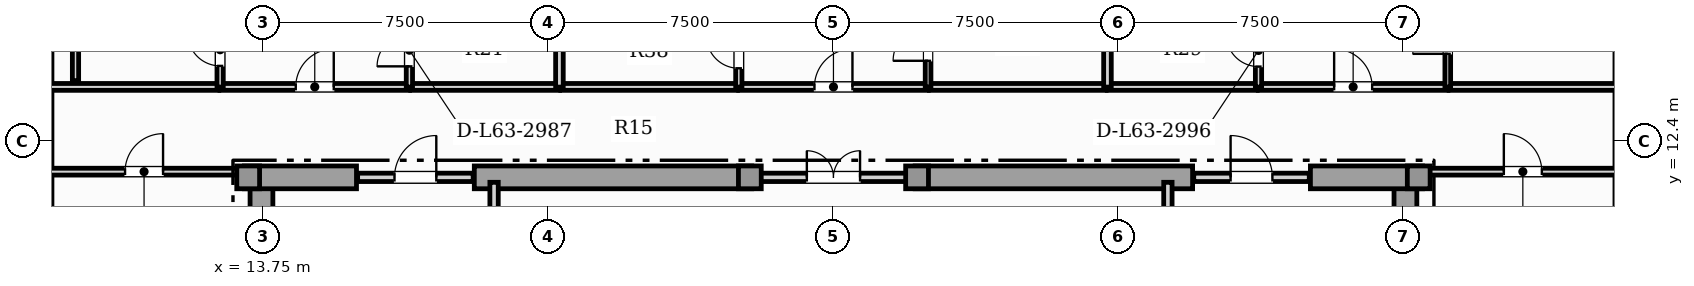
"""IFC4 building model, lengths in metres.
Left out: names, types, materials, properties, quantities, classifications, styles, units other than length and angle.
Written with IfcOpenShell. Run it as: python <this file> out.ifc"""

import sys

from ifc_helpers import new_model, si_unit, direction, frame, frame_2d, origin, origin_2d, place, context, subcontext, project, spatial, rectangle, extrude, element, fill, save


model = new_model("IFC4")
c1 = context("Model", 3, precision=1e-05, world=origin(), true_north=direction((0.0, 1.0)))
c2 = subcontext(c1, "Body", "Model", "MODEL_VIEW")
j1 = project(units=[si_unit("LENGTHUNIT", "METRE"), si_unit("PLANEANGLEUNIT", "RADIAN")], contexts=[c1])
p1 = place(None, origin())
s1 = spatial("IfcSite", under=j1, at=p1, CompositionType="ELEMENT")
p2 = place(p1, origin())
s2 = spatial("IfcBuilding", under=s1, at=p2, CompositionType="ELEMENT")
p3 = place(p2, frame((0.0, 0.0, 256.75)))
s3 = spatial("IfcBuildingStorey", under=s2, at=p3, CompositionType="ELEMENT", Elevation=256.75)
for number, where, z_axis, x_axis in (
    (1, (13.7, 0.92, 0.0), (0.0, 0.0, 1.0), (0.0, 1.0, 0.0)),
    (2, (43.8, 0.92, 0.0), (0.0, 0.0, 1.0), (0.0, 1.0, 0.0)),
):
    element("IfcWall", number, at=place(p3, frame(where, z_axis=z_axis, x_axis=x_axis)), inside=s3, PredefinedType="SHEAR", context=c2, shape_type="SweptSolid", body=[
        extrude(rectangle(XDim=10.53, YDim=0.6, at=frame_2d((5.265, 0.0))), origin(), (0.0, 0.0, 1.0), 3.65),
    ])
p4 = place(p3, frame((13.25, 11.45, 0.0), z_axis=(0.0, 0.0, 1.0), x_axis=(1.0, 0.0, 0.0)))
e3 = element("IfcWall", 3, at=p4, inside=s3, PredefinedType="SHEAR", context=c2, shape_type="SweptSolid", body=[
    extrude(rectangle(XDim=2.95, YDim=0.6, at=frame_2d((1.475, 0.0))), origin(), (0.0, 0.0, 1.0), 3.65),
])
for number, where, z_axis, x_axis in (
    (4, (19.3, 11.45, 0.0), (0.0, 0.0, 1.0), (1.0, 0.0, 0.0)),
    (5, (30.9, 11.45, 0.0), (0.0, 0.0, 1.0), (1.0, 0.0, 0.0)),
):
    element("IfcWall", number, at=place(p3, frame(where, z_axis=z_axis, x_axis=x_axis)), inside=s3, PredefinedType="SHEAR", context=c2, shape_type="SweptSolid", body=[
        extrude(rectangle(XDim=7.3, YDim=0.6, at=frame_2d((3.65, 0.0))), origin(), (0.0, 0.0, 1.0), 3.65),
    ])
p5 = place(p3, frame((41.3, 11.45, 0.0), z_axis=(0.0, 0.0, 1.0), x_axis=(1.0, 0.0, 0.0)))
e6 = element("IfcWall", 6, at=p5, inside=s3, PredefinedType="SHEAR", context=c2, shape_type="SweptSolid", body=[
    extrude(rectangle(XDim=2.95, YDim=0.6, at=frame_2d((1.475, 0.0))), origin(), (0.0, 0.0, 1.0), 3.65),
])
for number, where, z_axis, x_axis in (
    (7, (13.35, 11.45, 0.0), (0.0, 0.0, 1.0), (1.0, 0.0, 0.0)),
    (8, (44.15, 11.45, 0.0), (0.0, 0.0, 1.0), (1.0, 0.0, 0.0)),
    (9, (26.55, 11.45, 0.0), (0.0, 0.0, 1.0), (1.0, 0.0, 0.0)),
    (10, (30.95, 11.45, 0.0), (0.0, 0.0, 1.0), (1.0, 0.0, 0.0)),
):
    element("IfcColumn", number, at=place(p3, frame(where, z_axis=z_axis, x_axis=x_axis)), inside=s3, PredefinedType="COLUMN", context=c2, shape_type="SweptSolid", body=[
        extrude(rectangle(XDim=0.6, YDim=0.6, at=origin_2d()), origin(), (0.0, 0.0, 1.0), 3.85),
    ])
p6 = place(p3, frame((19.82, 8.52, 0.0), z_axis=(0.0, 0.0, 1.0), x_axis=(0.0, 1.0, 0.0)))
e11 = element("IfcWall", 11, at=p6, inside=s3, PredefinedType="SOLIDWALL", context=c2, shape_type="SweptSolid", body=[
    extrude(rectangle(XDim=2.8, YDim=0.22, at=frame_2d((1.4, 0.0))), origin(), (0.0, 0.0, 1.0), 3.105),
])
p7 = place(p6, frame((0.85, 0.0, 0.0)))
e12 = element("IfcOpeningElement", 12, at=p7, cuts=e11, PredefinedType="OPENING", context=c2, shape_type="SweptSolid", body=[
    extrude(rectangle(XDim=1.1, YDim=2.2, at=frame_2d((0.55, 1.1))), frame((0.0, 0.12, 0.0), z_axis=(0.0, -1.0, 0.0), x_axis=(1.0, 0.0, 0.0)), (0.0, 0.0, 1.0), 0.24),
])
p8 = place(p3, frame((37.55, 8.52, 0.0), z_axis=(0.0, 0.0, 1.0), x_axis=(0.0, 1.0, 0.0)))
e13 = element("IfcWall", 13, at=p8, inside=s3, PredefinedType="SOLIDWALL", context=c2, shape_type="SweptSolid", body=[
    extrude(rectangle(XDim=2.8, YDim=0.22, at=frame_2d((1.4, 0.0))), origin(), (0.0, 0.0, 1.0), 3.105),
])
p9 = place(p8, frame((0.85, 0.0, 0.0)))
e14 = element("IfcOpeningElement", 14, at=p9, cuts=e13, PredefinedType="OPENING", context=c2, shape_type="SweptSolid", body=[
    extrude(rectangle(XDim=1.1, YDim=2.2, at=frame_2d((0.55, 1.1))), frame((0.0, 0.12, 0.0), z_axis=(0.0, -1.0, 0.0), x_axis=(1.0, 0.0, 0.0)), (0.0, 0.0, 1.0), 0.24),
])
p10 = place(p3, frame((16.23, 11.45, 0.0), z_axis=(0.0, 0.0, 1.0), x_axis=(1.0, 0.0, 0.0)))
e15 = element("IfcWall", 15, at=p10, inside=s3, PredefinedType="SOLIDWALL", context=c2, shape_type="SweptSolid", body=[
    extrude(rectangle(XDim=3.04, YDim=0.22, at=frame_2d((1.52, 0.0))), origin(), (0.0, 0.0, 1.0), 3.65),
])
p11 = place(p10, frame((0.97, 0.0, 0.0)))
e16 = element("IfcOpeningElement", 16, at=p11, cuts=e15, PredefinedType="OPENING", context=c2, shape_type="SweptSolid", body=[
    extrude(rectangle(XDim=1.1, YDim=2.2, at=frame_2d((0.55, 1.1))), frame((0.0, 0.12, 0.0), z_axis=(0.0, -1.0, 0.0), x_axis=(1.0, 0.0, 0.0)), (0.0, 0.0, 1.0), 0.24),
])
p12 = place(p3, frame((26.63, 11.45, 0.0), z_axis=(0.0, 0.0, 1.0), x_axis=(1.0, 0.0, 0.0)))
e17 = element("IfcWall", 17, at=p12, inside=s3, PredefinedType="SOLIDWALL", context=c2, shape_type="SweptSolid", body=[
    extrude(rectangle(XDim=4.24, YDim=0.22, at=frame_2d((2.12, 0.0))), origin(), (0.0, 0.0, 1.0), 3.65),
])
p13 = place(p12, frame((1.42, 0.0, 0.0)))
e18 = element("IfcOpeningElement", 18, at=p13, cuts=e17, PredefinedType="OPENING", context=c2, shape_type="SweptSolid", body=[
    extrude(rectangle(XDim=1.4, YDim=2.2, at=frame_2d((0.7, 1.1))), frame((0.0, 0.12, 0.0), z_axis=(0.0, -1.0, 0.0), x_axis=(1.0, 0.0, 0.0)), (0.0, 0.0, 1.0), 0.24),
])
p14 = place(p3, frame((38.23, 11.45, 0.0), z_axis=(0.0, 0.0, 1.0), x_axis=(1.0, 0.0, 0.0)))
e19 = element("IfcWall", 19, at=p14, inside=s3, PredefinedType="SOLIDWALL", context=c2, shape_type="SweptSolid", body=[
    extrude(rectangle(XDim=3.04, YDim=0.22, at=frame_2d((1.52, 0.0))), origin(), (0.0, 0.0, 1.0), 3.65),
])
p15 = place(p14, frame((0.97, 0.0, 0.0)))
e20 = element("IfcOpeningElement", 20, at=p15, cuts=e19, PredefinedType="OPENING", context=c2, shape_type="SweptSolid", body=[
    extrude(rectangle(XDim=1.1, YDim=2.2, at=frame_2d((0.55, 1.1))), frame((0.0, 0.12, 0.0), z_axis=(0.0, -1.0, 0.0), x_axis=(1.0, 0.0, 0.0)), (0.0, 0.0, 1.0), 0.24),
])
p16 = place(p3, frame((8.076, 11.6, 0.0), z_axis=(0.0, 0.0, 1.0), x_axis=(1.0, 0.0, 0.0)))
e21 = element("IfcWall", 21, at=p16, inside=s3, PredefinedType="PARTITIONING", context=c2, shape_type="SweptSolid", body=[
    extrude(rectangle(XDim=5.069, YDim=0.18, at=frame_2d((2.534, 0.0))), origin(), (0.0, 0.0, 1.0), 3.65),
])
p17 = place(p16, frame((2.034, 0.0, 0.0)))
e22 = element("IfcOpeningElement", 22, at=p17, cuts=e21, PredefinedType="OPENING", context=c2, shape_type="SweptSolid", body=[
    extrude(rectangle(XDim=1.0, YDim=2.15, at=frame_2d((0.5, 1.075))), frame((0.0, 0.1, 0.0), z_axis=(0.0, -1.0, 0.0), x_axis=(1.0, 0.0, 0.0)), (0.0, 0.0, 1.0), 0.2),
])
p18 = place(p3, frame((44.355, 11.6, 0.0), z_axis=(0.0, 0.0, 1.0), x_axis=(1.0, 0.0, 0.0)))
e23 = element("IfcWall", 23, at=p18, inside=s3, PredefinedType="PARTITIONING", context=c2, shape_type="SweptSolid", body=[
    extrude(rectangle(XDim=5.069, YDim=0.18, at=frame_2d((2.534, 0.0))), origin(), (0.0, 0.0, 1.0), 3.65),
])
p19 = place(p18, frame((2.034, 0.0, 0.0)))
e24 = element("IfcOpeningElement", 24, at=p19, cuts=e23, PredefinedType="OPENING", context=c2, shape_type="SweptSolid", body=[
    extrude(rectangle(XDim=1.0, YDim=2.15, at=frame_2d((0.5, 1.075))), frame((0.0, 0.1, 0.0), z_axis=(0.0, -1.0, 0.0), x_axis=(1.0, 0.0, 0.0)), (0.0, 0.0, 1.0), 0.2),
])
p20 = place(p3, frame((12.607, 13.83, 0.0), z_axis=(0.0, 0.0, 1.0), x_axis=(1.0, 0.0, 0.0)))
e25 = element("IfcWall", 25, at=p20, inside=s3, PredefinedType="PARTITIONING", context=c2, shape_type="SweptSolid", body=[
    extrude(rectangle(XDim=4.99, YDim=0.18, at=frame_2d((2.495, 0.0))), origin(), (0.0, 0.0, 1.0), 3.65),
])
p21 = place(p20, frame((1.995, 0.0, 0.0)))
e26 = element("IfcOpeningElement", 26, at=p21, cuts=e25, PredefinedType="OPENING", context=c2, shape_type="SweptSolid", body=[
    extrude(rectangle(XDim=1.0, YDim=2.15, at=frame_2d((0.5, 1.075))), frame((0.0, 0.1, 0.0), z_axis=(0.0, -1.0, 0.0), x_axis=(1.0, 0.0, 0.0)), (0.0, 0.0, 1.0), 0.2),
])
p22 = place(p3, frame((8.076, 13.83, 0.0), z_axis=(0.0, 0.0, 1.0), x_axis=(1.0, 0.0, 0.0)))
e27 = element("IfcWall", 27, at=p22, inside=s3, PredefinedType="PARTITIONING", context=c2, shape_type="SweptSolid", body=[
    extrude(rectangle(XDim=4.501, YDim=0.18, at=frame_2d((2.25, 0.0))), origin(), (0.0, 0.0, 1.0), 3.65),
])
p23 = place(p3, frame((17.627, 13.83, 0.0), z_axis=(0.0, 0.0, 1.0), x_axis=(1.0, 0.0, 0.0)))
e28 = element("IfcWall", 28, at=p23, inside=s3, PredefinedType="PARTITIONING", context=c2, shape_type="SweptSolid", body=[
    extrude(rectangle(XDim=3.918, YDim=0.18, at=frame_2d((1.959, 0.0))), origin(), (0.0, 0.0, 1.0), 3.65),
])
p24 = place(p3, frame((39.929, 13.83, 0.0), z_axis=(0.0, 0.0, 1.0), x_axis=(1.0, 0.0, 0.0)))
e29 = element("IfcWall", 29, at=p24, inside=s3, PredefinedType="PARTITIONING", context=c2, shape_type="SweptSolid", body=[
    extrude(rectangle(XDim=4.99, YDim=0.18, at=frame_2d((2.495, 0.0))), origin(), (0.0, 0.0, 1.0), 3.65),
])
p25 = place(p24, frame((1.995, 0.0, 0.0)))
e30 = element("IfcOpeningElement", 30, at=p25, cuts=e29, PredefinedType="OPENING", context=c2, shape_type="SweptSolid", body=[
    extrude(rectangle(XDim=1.0, YDim=2.15, at=frame_2d((0.5, 1.075))), frame((0.0, 0.1, 0.0), z_axis=(0.0, -1.0, 0.0), x_axis=(1.0, 0.0, 0.0)), (0.0, 0.0, 1.0), 0.2),
])
p26 = place(p3, frame((35.955, 13.83, 0.0), z_axis=(0.0, 0.0, 1.0), x_axis=(1.0, 0.0, 0.0)))
e31 = element("IfcWall", 31, at=p26, inside=s3, PredefinedType="PARTITIONING", context=c2, shape_type="SweptSolid", body=[
    extrude(rectangle(XDim=3.944, YDim=0.18, at=frame_2d((1.972, 0.0))), origin(), (0.0, 0.0, 1.0), 3.65),
])
p27 = place(p3, frame((44.949, 13.83, 0.0), z_axis=(0.0, 0.0, 1.0), x_axis=(1.0, 0.0, 0.0)))
e32 = element("IfcWall", 32, at=p27, inside=s3, PredefinedType="PARTITIONING", context=c2, shape_type="SweptSolid", body=[
    extrude(rectangle(XDim=4.475, YDim=0.18, at=frame_2d((2.237, 0.0))), origin(), (0.0, 0.0, 1.0), 3.65),
])
p28 = place(p3, frame((26.255, 13.83, 0.0), z_axis=(0.0, 0.0, 1.0), x_axis=(1.0, 0.0, 0.0)))
e33 = element("IfcWall", 33, at=p28, inside=s3, PredefinedType="PARTITIONING", context=c2, shape_type="SweptSolid", body=[
    extrude(rectangle(XDim=4.99, YDim=0.18, at=frame_2d((2.495, 0.0))), origin(), (0.0, 0.0, 1.0), 3.65),
])
p29 = place(p28, frame((1.995, 0.0, 0.0)))
e34 = element("IfcOpeningElement", 34, at=p29, cuts=e33, PredefinedType="OPENING", context=c2, shape_type="SweptSolid", body=[
    extrude(rectangle(XDim=1.0, YDim=2.15, at=frame_2d((0.5, 1.075))), frame((0.0, 0.1, 0.0), z_axis=(0.0, -1.0, 0.0), x_axis=(1.0, 0.0, 0.0)), (0.0, 0.0, 1.0), 0.2),
])
for number, where, z_axis, x_axis in (
    (35, (21.575, 13.83, 0.0), (0.0, 0.0, 1.0), (1.0, 0.0, 0.0)),
    (36, (31.275, 13.83, 0.0), (0.0, 0.0, 1.0), (1.0, 0.0, 0.0)),
):
    element("IfcWall", number, at=place(p3, frame(where, z_axis=z_axis, x_axis=x_axis)), inside=s3, PredefinedType="PARTITIONING", context=c2, shape_type="SweptSolid", body=[
        extrude(rectangle(XDim=4.65, YDim=0.18, at=frame_2d((2.325, 0.0))), origin(), (0.0, 0.0, 1.0), 3.65),
    ])
p30 = place(p3, frame((12.612, 13.825, 0.0), z_axis=(0.0, 0.0, 1.0), x_axis=(0.0, 1.0, 0.0)))
e37 = element("IfcWall", 37, at=p30, inside=s3, PredefinedType="PLUMBINGWALL", context=c2, shape_type="SweptSolid", body=[
    extrude(rectangle(XDim=1.967, YDim=0.165, at=frame_2d((0.983, 0.0))), origin(), (0.0, 0.0, 1.0), 3.65),
])
p31 = place(p30, frame((0.558, 0.0, 0.0)))
e38 = element("IfcOpeningElement", 38, at=p31, cuts=e37, PredefinedType="OPENING", context=c2, shape_type="SweptSolid", body=[
    extrude(rectangle(XDim=0.85, YDim=2.1, at=frame_2d((0.425, 1.05))), frame((0.0, 0.093, 0.0), z_axis=(0.0, -1.0, 0.0), x_axis=(1.0, 0.0, 0.0)), (0.0, 0.0, 1.0), 0.185),
])
p32 = place(p3, frame((17.592, 13.825, 0.0), z_axis=(0.0, 0.0, 1.0), x_axis=(0.0, 1.0, 0.0)))
e39 = element("IfcWall", 39, at=p32, inside=s3, PredefinedType="PLUMBINGWALL", context=c2, shape_type="SweptSolid", body=[
    extrude(rectangle(XDim=1.942, YDim=0.165, at=frame_2d((0.971, 0.0))), origin(), (0.0, 0.0, 1.0), 3.65),
])
p33 = place(p32, frame((0.546, 0.0, 0.0)))
e40 = element("IfcOpeningElement", 40, at=p33, cuts=e39, PredefinedType="OPENING", context=c2, shape_type="SweptSolid", body=[
    extrude(rectangle(XDim=0.85, YDim=2.1, at=frame_2d((0.425, 1.05))), frame((0.0, 0.093, 0.0), z_axis=(0.0, -1.0, 0.0), x_axis=(1.0, 0.0, 0.0)), (0.0, 0.0, 1.0), 0.185),
])
p34 = place(p3, frame((21.54, 13.825, 0.0), z_axis=(0.0, 0.0, 1.0), x_axis=(0.0, 1.0, 0.0)))
e41 = element("IfcWall", 41, at=p34, inside=s3, PredefinedType="PARTITIONING", context=c2, shape_type="SweptSolid", body=[
    extrude(rectangle(XDim=1.84, YDim=0.2, at=frame_2d((0.92, 0.0))), origin(), (0.0, 0.0, 1.0), 3.65),
])
p35 = place(p3, frame((39.934, 13.825, 0.0), z_axis=(0.0, 0.0, 1.0), x_axis=(0.0, 1.0, 0.0)))
e42 = element("IfcWall", 42, at=p35, inside=s3, PredefinedType="PLUMBINGWALL", context=c2, shape_type="SweptSolid", body=[
    extrude(rectangle(XDim=1.929, YDim=0.165, at=frame_2d((0.965, 0.0))), origin(), (0.0, 0.0, 1.0), 3.65),
])
p36 = place(p35, frame((0.54, 0.0, 0.0)))
e43 = element("IfcOpeningElement", 43, at=p36, cuts=e42, PredefinedType="OPENING", context=c2, shape_type="SweptSolid", body=[
    extrude(rectangle(XDim=0.85, YDim=2.1, at=frame_2d((0.425, 1.05))), frame((0.0, 0.093, 0.0), z_axis=(0.0, -1.0, 0.0), x_axis=(1.0, 0.0, 0.0)), (0.0, 0.0, 1.0), 0.185),
])
p37 = place(p3, frame((44.914, 13.825, 0.0), z_axis=(0.0, 0.0, 1.0), x_axis=(0.0, 1.0, 0.0)))
e44 = element("IfcWall", 44, at=p37, inside=s3, PredefinedType="PARTITIONING", context=c2, shape_type="SweptSolid", body=[
    extrude(rectangle(XDim=2.67, YDim=0.15, at=frame_2d((1.335, 0.0))), origin(), (0.0, 0.0, 1.0), 3.65),
])
p38 = place(p37, frame((0.875, 0.0, 0.0)))
e45 = element("IfcOpeningElement", 45, at=p38, cuts=e44, PredefinedType="OPENING", context=c2, shape_type="SweptSolid", body=[
    extrude(rectangle(XDim=0.92, YDim=2.1, at=frame_2d((0.46, 1.05))), frame((0.0, 0.085, 0.0), z_axis=(0.0, -1.0, 0.0), x_axis=(1.0, 0.0, 0.0)), (0.0, 0.0, 1.0), 0.17),
])
p39 = place(p3, frame((35.96, 13.825, 0.0), z_axis=(0.0, 0.0, 1.0), x_axis=(0.0, 1.0, 0.0)))
e46 = element("IfcWall", 46, at=p39, inside=s3, PredefinedType="PARTITIONING", context=c2, shape_type="SweptSolid", body=[
    extrude(rectangle(XDim=1.929, YDim=0.2, at=frame_2d((0.965, 0.0))), origin(), (0.0, 0.0, 1.0), 3.65),
])
p40 = place(p3, frame((26.26, 13.825, 0.0), z_axis=(0.0, 0.0, 1.0), x_axis=(0.0, 1.0, 0.0)))
e47 = element("IfcWall", 47, at=p40, inside=s3, PredefinedType="PLUMBINGWALL", context=c2, shape_type="SweptSolid", body=[
    extrude(rectangle(XDim=1.84, YDim=0.165, at=frame_2d((0.92, 0.0))), origin(), (0.0, 0.0, 1.0), 3.65),
])
p41 = place(p40, frame((0.495, 0.0, 0.0)))
e48 = element("IfcOpeningElement", 48, at=p41, cuts=e47, PredefinedType="OPENING", context=c2, shape_type="SweptSolid", body=[
    extrude(rectangle(XDim=0.85, YDim=2.1, at=frame_2d((0.425, 1.05))), frame((0.0, 0.093, 0.0), z_axis=(0.0, -1.0, 0.0), x_axis=(1.0, 0.0, 0.0)), (0.0, 0.0, 1.0), 0.185),
])
p42 = place(p3, frame((31.24, 13.825, 0.0), z_axis=(0.0, 0.0, 1.0), x_axis=(0.0, 1.0, 0.0)))
e49 = element("IfcWall", 49, at=p42, inside=s3, PredefinedType="PARTITIONING", context=c2, shape_type="SweptSolid", body=[
    extrude(rectangle(XDim=2.304, YDim=0.15, at=frame_2d((1.152, 0.0))), origin(), (0.0, 0.0, 1.0), 3.65),
])
p43 = place(p42, frame((0.692, 0.0, 0.0)))
e50 = element("IfcOpeningElement", 50, at=p43, cuts=e49, PredefinedType="OPENING", context=c2, shape_type="SweptSolid", body=[
    extrude(rectangle(XDim=0.92, YDim=2.1, at=frame_2d((0.46, 1.05))), frame((0.0, 0.085, 0.0), z_axis=(0.0, -1.0, 0.0), x_axis=(1.0, 0.0, 0.0)), (0.0, 0.0, 1.0), 0.17),
])
p44 = place(p3, frame((8.807, 13.995, 0.0), z_axis=(0.0, 0.0, 1.0), x_axis=(0.0, 1.0, 0.0)))
e51 = element("IfcWall", 51, at=p44, inside=s3, PredefinedType="PLUMBINGWALL", context=c2, shape_type="SweptSolid", body=[
    extrude(rectangle(XDim=1.626, YDim=0.165, at=frame_2d((0.813, 0.0))), origin(), (0.0, 0.0, 1.0), 3.65),
])
p45 = place(p11, origin())
e52 = element("IfcDoor", 52, at=p45, inside=s3, OperationType="SINGLE_SWING_RIGHT", PredefinedType="DOOR", context=c2, shape_type="SweptSolid", body=[
    extrude(rectangle(XDim=1.1, YDim=2.2, at=frame_2d((0.55, 1.1))), frame((0.0, 0.025, 0.0), z_axis=(0.0, -1.0, 0.0), x_axis=(1.0, 0.0, 0.0)), (0.0, 0.0, 1.0), 0.05),
])
fill(e16, e52)
p46 = place(p13, origin())
e53 = element("IfcDoor", 53, at=p46, inside=s3, OperationType="DOUBLE_DOOR_SINGLE_SWING", PredefinedType="DOOR", context=c2, shape_type="SweptSolid", body=[
    extrude(rectangle(XDim=1.4, YDim=2.2, at=frame_2d((0.7, 1.1))), frame((0.0, 0.025, 0.0), z_axis=(0.0, -1.0, 0.0), x_axis=(1.0, 0.0, 0.0)), (0.0, 0.0, 1.0), 0.05),
])
fill(e18, e53)
p47 = place(p15, origin())
e54 = element("IfcDoor", 54, at=p47, inside=s3, OperationType="SINGLE_SWING_LEFT", PredefinedType="DOOR", context=c2, shape_type="SweptSolid", body=[
    extrude(rectangle(XDim=1.1, YDim=2.2, at=frame_2d((0.55, 1.1))), frame((0.0, 0.025, 0.0), z_axis=(0.0, -1.0, 0.0), x_axis=(1.0, 0.0, 0.0)), (0.0, 0.0, 1.0), 0.05),
])
fill(e20, e54)
p48 = place(p17, origin())
e55 = element("IfcDoor", 55, at=p48, inside=s3, OperationType="SINGLE_SWING_RIGHT", PredefinedType="DOOR", context=c2, shape_type="SweptSolid", body=[
    extrude(rectangle(XDim=1.0, YDim=2.15, at=frame_2d((0.5, 1.075))), frame((0.0, 0.025, 0.0), z_axis=(0.0, -1.0, 0.0), x_axis=(1.0, 0.0, 0.0)), (0.0, 0.0, 1.0), 0.05),
])
fill(e22, e55)
p49 = place(p19, origin())
e56 = element("IfcDoor", 56, at=p49, inside=s3, OperationType="SINGLE_SWING_LEFT", PredefinedType="DOOR", context=c2, shape_type="SweptSolid", body=[
    extrude(rectangle(XDim=1.0, YDim=2.15, at=frame_2d((0.5, 1.075))), frame((0.0, 0.025, 0.0), z_axis=(0.0, -1.0, 0.0), x_axis=(1.0, 0.0, 0.0)), (0.0, 0.0, 1.0), 0.05),
])
fill(e24, e56)
p50 = place(p21, origin())
e57 = element("IfcDoor", 57, at=p50, inside=s3, OperationType="SINGLE_SWING_RIGHT", PredefinedType="DOOR", context=c2, shape_type="SweptSolid", body=[
    extrude(rectangle(XDim=1.0, YDim=2.15, at=frame_2d((0.5, 1.075))), frame((0.0, 0.025, 0.0), z_axis=(0.0, -1.0, 0.0), x_axis=(1.0, 0.0, 0.0)), (0.0, 0.0, 1.0), 0.05),
])
fill(e26, e57)
p51 = place(p25, origin())
e58 = element("IfcDoor", 58, at=p51, inside=s3, OperationType="SINGLE_SWING_LEFT", PredefinedType="DOOR", context=c2, shape_type="SweptSolid", body=[
    extrude(rectangle(XDim=1.0, YDim=2.15, at=frame_2d((0.5, 1.075))), frame((0.0, 0.025, 0.0), z_axis=(0.0, -1.0, 0.0), x_axis=(1.0, 0.0, 0.0)), (0.0, 0.0, 1.0), 0.05),
])
fill(e30, e58)
p52 = place(p29, origin())
e59 = element("IfcDoor", 59, at=p52, inside=s3, OperationType="SINGLE_SWING_RIGHT", PredefinedType="DOOR", context=c2, shape_type="SweptSolid", body=[
    extrude(rectangle(XDim=1.0, YDim=2.15, at=frame_2d((0.5, 1.075))), frame((0.0, 0.025, 0.0), z_axis=(0.0, -1.0, 0.0), x_axis=(1.0, 0.0, 0.0)), (0.0, 0.0, 1.0), 0.05),
])
fill(e34, e59)
p53 = place(p31, origin())
e60 = element("IfcDoor", 60, at=p53, inside=s3, OperationType="SINGLE_SWING_RIGHT", PredefinedType="DOOR", context=c2, shape_type="SweptSolid", body=[
    extrude(rectangle(XDim=0.85, YDim=2.1, at=frame_2d((0.425, 1.05))), frame((0.0, 0.025, 0.0), z_axis=(0.0, -1.0, 0.0), x_axis=(1.0, 0.0, 0.0)), (0.0, 0.0, 1.0), 0.05),
])
fill(e38, e60)
p54 = place(p33, origin())
e61 = element("IfcDoor", 61, at=p54, inside=s3, OperationType="SINGLE_SWING_LEFT", PredefinedType="DOOR", context=c2, shape_type="SweptSolid", body=[
    extrude(rectangle(XDim=0.85, YDim=2.1, at=frame_2d((0.425, 1.05))), frame((0.0, 0.025, 0.0), z_axis=(0.0, -1.0, 0.0), x_axis=(1.0, 0.0, 0.0)), (0.0, 0.0, 1.0), 0.05),
])
fill(e40, e61)
p55 = place(p36, origin())
e62 = element("IfcDoor", 62, at=p55, inside=s3, OperationType="SINGLE_SWING_RIGHT", PredefinedType="DOOR", context=c2, shape_type="SweptSolid", body=[
    extrude(rectangle(XDim=0.85, YDim=2.1, at=frame_2d((0.425, 1.05))), frame((0.0, 0.025, 0.0), z_axis=(0.0, -1.0, 0.0), x_axis=(1.0, 0.0, 0.0)), (0.0, 0.0, 1.0), 0.05),
])
fill(e43, e62)
p56 = place(p38, origin())
e63 = element("IfcDoor", 63, at=p56, inside=s3, OperationType="SINGLE_SWING_LEFT", PredefinedType="DOOR", context=c2, shape_type="SweptSolid", body=[
    extrude(rectangle(XDim=0.92, YDim=2.1, at=frame_2d((0.46, 1.05))), frame((0.0, 0.025, 0.0), z_axis=(0.0, -1.0, 0.0), x_axis=(1.0, 0.0, 0.0)), (0.0, 0.0, 1.0), 0.05),
])
fill(e45, e63)
p57 = place(p41, origin())
e64 = element("IfcDoor", 64, at=p57, inside=s3, OperationType="SINGLE_SWING_RIGHT", PredefinedType="DOOR", context=c2, shape_type="SweptSolid", body=[
    extrude(rectangle(XDim=0.85, YDim=2.1, at=frame_2d((0.425, 1.05))), frame((0.0, 0.025, 0.0), z_axis=(0.0, -1.0, 0.0), x_axis=(1.0, 0.0, 0.0)), (0.0, 0.0, 1.0), 0.05),
])
fill(e48, e64)
p58 = place(p43, origin())
e65 = element("IfcDoor", 65, at=p58, inside=s3, OperationType="SINGLE_SWING_LEFT", PredefinedType="DOOR", context=c2, shape_type="SweptSolid", body=[
    extrude(rectangle(XDim=0.92, YDim=2.1, at=frame_2d((0.46, 1.05))), frame((0.0, 0.025, 0.0), z_axis=(0.0, -1.0, 0.0), x_axis=(1.0, 0.0, 0.0)), (0.0, 0.0, 1.0), 0.05),
])
fill(e50, e65)
save(model, sys.argv[1])
